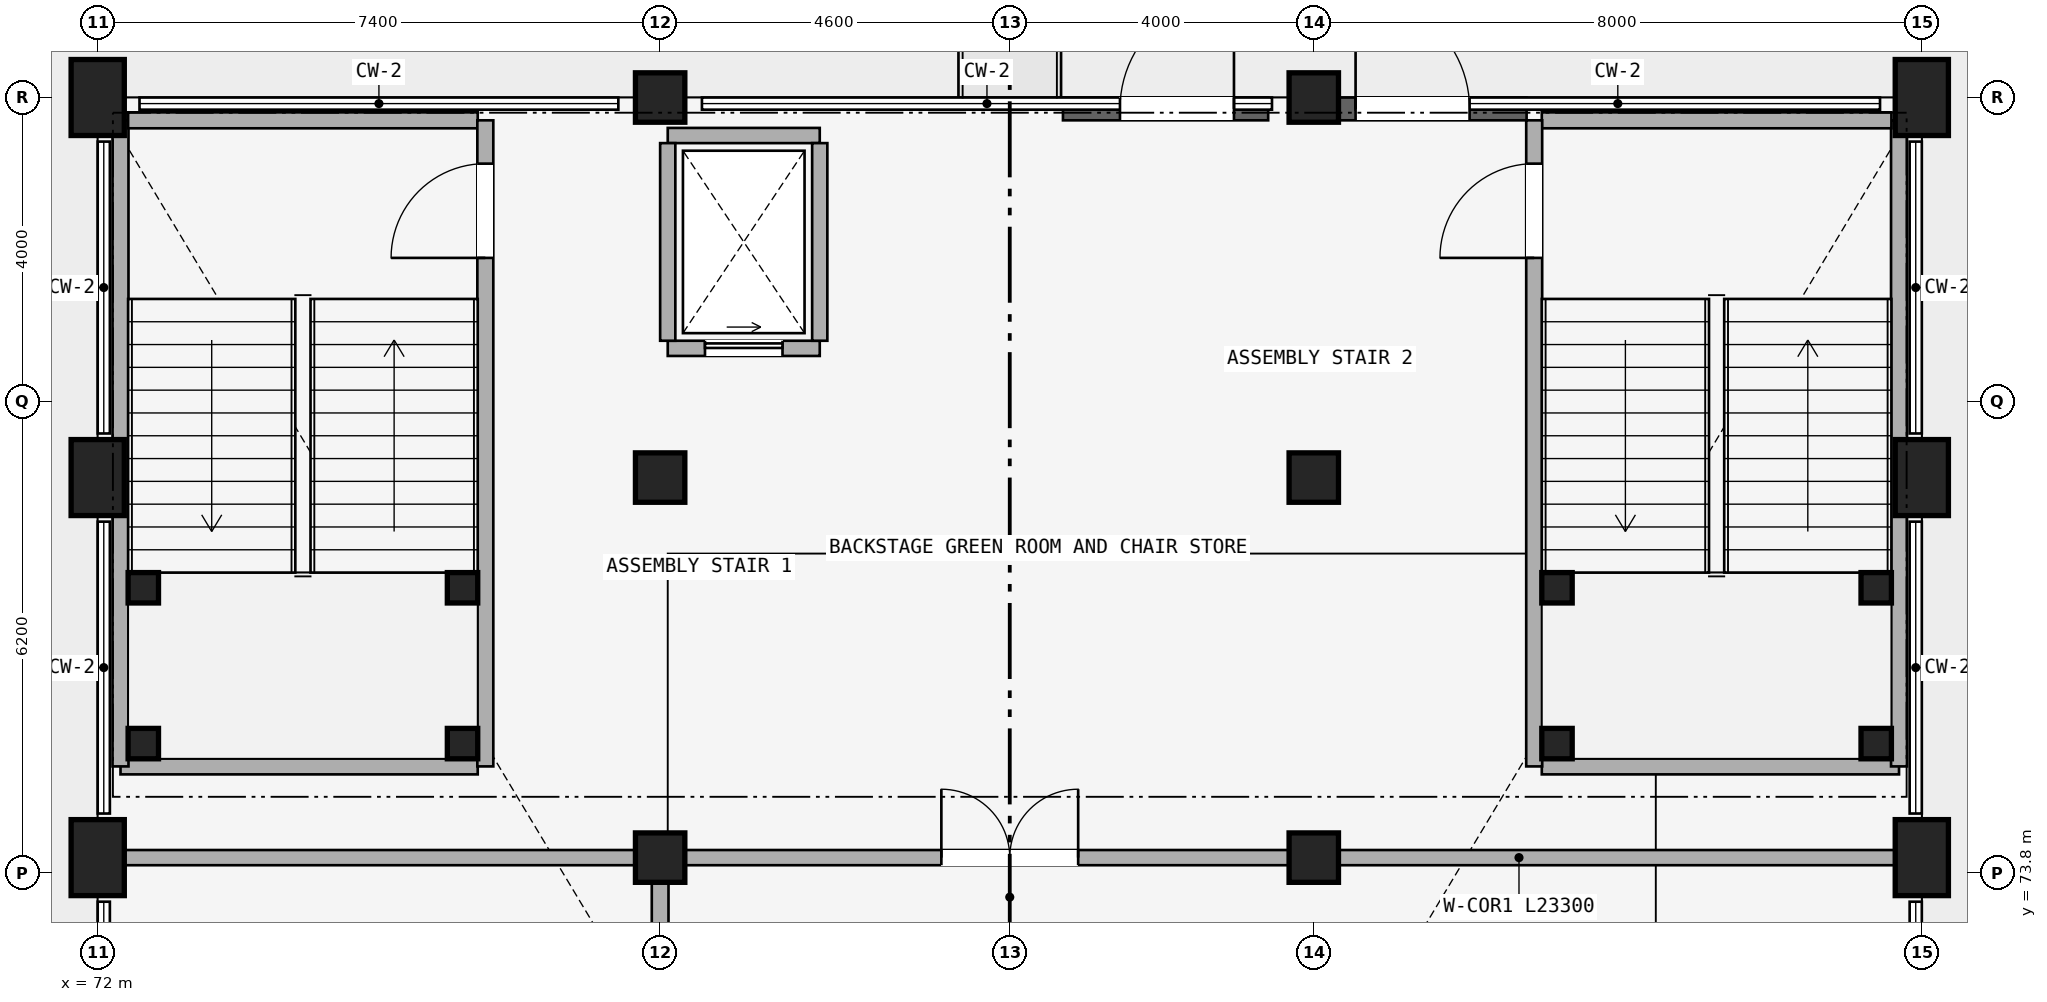
"""IFC4 building model, lengths in metres.
Left out: names, types, materials, properties, quantities, classifications, styles, units other than length and angle.
Written with IfcOpenShell. Run it as: python <this file> out.ifc"""

import sys

from ifc_helpers import new_model, si_unit, direction, frame, frame_2d, origin, origin_2d, place, context, subcontext, project, spatial, rectangle, extrude, element, fill, save


model = new_model("IFC4")
c1 = context("Model", 3, precision=1e-05, world=origin(), true_north=direction((0.0, 1.0)))
c2 = subcontext(c1, "Body", "Model", "MODEL_VIEW")
j1 = project(units=[si_unit("LENGTHUNIT", "METRE"), si_unit("PLANEANGLEUNIT", "RADIAN")], contexts=[c1])
p1 = place(None, origin())
s1 = spatial("IfcSite", under=j1, at=p1, CompositionType="ELEMENT")
p2 = place(p1, origin())
s2 = spatial("IfcBuilding", under=s1, at=p2, CompositionType="ELEMENT")
p3 = place(p2, origin())
s3 = spatial("IfcBuildingStorey", under=s2, at=p3, CompositionType="ELEMENT", Elevation=0.0)
for number, where, z_axis, x_axis in (
    (1, (72.0, 74.0, 0.0), (0.0, 0.0, 1.0), (1.0, 0.0, 0.0)),
    (2, (96.0, 74.0, 0.0), (0.0, 0.0, 1.0), (1.0, 0.0, 0.0)),
    (3, (72.0, 79.0, 0.0), (0.0, 0.0, 1.0), (1.0, 0.0, 0.0)),
    (4, (96.0, 79.0, 0.0), (0.0, 0.0, 1.0), (1.0, 0.0, 0.0)),
    (5, (72.0, 84.0, 0.0), (0.0, 0.0, 1.0), (1.0, 0.0, 0.0)),
    (6, (96.0, 84.0, 0.0), (0.0, 0.0, 1.0), (1.0, 0.0, 0.0)),
):
    element("IfcColumn", number, at=place(p3, frame(where, z_axis=z_axis, x_axis=x_axis)), inside=s3, PredefinedType="COLUMN", context=c2, shape_type="SweptSolid", body=[
        extrude(rectangle(XDim=0.7, YDim=1.0, at=origin_2d()), origin(), (0.0, 0.0, 1.0), 4.5),
    ])
for number, where, z_axis, x_axis in (
    (7, (79.4, 74.0, 0.0), (0.0, 0.0, 1.0), (1.0, 0.0, 0.0)),
    (8, (88.0, 74.0, 0.0), (0.0, 0.0, 1.0), (1.0, 0.0, 0.0)),
    (9, (79.4, 79.0, 0.0), (0.0, 0.0, 1.0), (1.0, 0.0, 0.0)),
    (10, (88.0, 79.0, 0.0), (0.0, 0.0, 1.0), (1.0, 0.0, 0.0)),
    (11, (79.4, 84.0, 0.0), (0.0, 0.0, 1.0), (1.0, 0.0, 0.0)),
    (12, (88.0, 84.0, 0.0), (0.0, 0.0, 1.0), (1.0, 0.0, 0.0)),
):
    element("IfcColumn", number, at=place(p3, frame(where, z_axis=z_axis, x_axis=x_axis)), inside=s3, PredefinedType="COLUMN", context=c2, shape_type="SweptSolid", body=[
        extrude(rectangle(XDim=0.65, YDim=0.65, at=origin_2d()), origin(), (0.0, 0.0, 1.0), 4.25),
    ])
for number, where, z_axis, x_axis in (
    (13, (72.6, 75.5, 0.0), (0.0, 0.0, 1.0), (1.0, 0.0, 0.0)),
    (14, (76.8, 75.5, 0.0), (0.0, 0.0, 1.0), (1.0, 0.0, 0.0)),
    (15, (72.6, 77.55, 0.0), (0.0, 0.0, 1.0), (1.0, 0.0, 0.0)),
    (16, (76.8, 77.55, 0.0), (0.0, 0.0, 1.0), (1.0, 0.0, 0.0)),
    (17, (91.2, 75.5, 0.0), (0.0, 0.0, 1.0), (1.0, 0.0, 0.0)),
    (18, (95.4, 75.5, 0.0), (0.0, 0.0, 1.0), (1.0, 0.0, 0.0)),
    (19, (91.2, 77.55, 0.0), (0.0, 0.0, 1.0), (1.0, 0.0, 0.0)),
    (20, (95.4, 77.55, 0.0), (0.0, 0.0, 1.0), (1.0, 0.0, 0.0)),
):
    element("IfcColumn", number, at=place(p3, frame(where, z_axis=z_axis, x_axis=x_axis)), inside=s3, PredefinedType="COLUMN", context=c2, shape_type="SweptSolid", body=[
        extrude(rectangle(XDim=0.4, YDim=0.4, at=origin_2d()), origin(), (0.0, 0.0, 1.0), 2.03),
    ])
p4 = place(p3, frame((72.3, 75.2, 0.0), z_axis=(0.0, 0.0, 1.0), x_axis=(1.0, 0.0, 0.0)))
e21 = element("IfcWall", 21, at=p4, inside=s3, PredefinedType="STANDARD", context=c2, shape_type="SweptSolid", body=[
    extrude(rectangle(XDim=4.7, YDim=0.21, at=frame_2d((2.35, 0.0))), origin(), (0.0, 0.0, 1.0), 4.22),
])
p5 = place(p3, frame((72.3, 75.2, 0.0), z_axis=(0.0, 0.0, 1.0), x_axis=(0.0, 1.0, 0.0)))
e22 = element("IfcWall", 22, at=p5, inside=s3, PredefinedType="STANDARD", context=c2, shape_type="SweptSolid", body=[
    extrude(rectangle(XDim=8.5, YDim=0.21, at=frame_2d((4.25, 0.0))), origin(), (0.0, 0.0, 1.0), 4.22),
])
p6 = place(p3, frame((72.4, 83.7, 0.0), z_axis=(0.0, 0.0, 1.0), x_axis=(1.0, 0.0, 0.0)))
e23 = element("IfcWall", 23, at=p6, inside=s3, PredefinedType="STANDARD", context=c2, shape_type="SweptSolid", body=[
    extrude(rectangle(XDim=4.6, YDim=0.21, at=frame_2d((2.3, 0.0))), origin(), (0.0, 0.0, 1.0), 3.492),
])
p7 = place(p3, frame((77.1, 75.2, 0.0), z_axis=(0.0, 0.0, 1.0), x_axis=(0.0, 1.0, 0.0)))
e24 = element("IfcWall", 24, at=p7, inside=s3, PredefinedType="STANDARD", context=c2, shape_type="SweptSolid", body=[
    extrude(rectangle(XDim=8.5, YDim=0.21, at=frame_2d((4.25, 0.0))), origin(), (0.0, 0.0, 1.0), 4.22),
])
p8 = place(p7, frame((6.69, 0.0, 0.0)))
e25 = element("IfcOpeningElement", 25, at=p8, cuts=e24, PredefinedType="OPENING", context=c2, shape_type="SweptSolid", body=[
    extrude(rectangle(XDim=1.24, YDim=2.15, at=frame_2d((0.62, 1.075))), frame((0.0, 0.115, 0.0), z_axis=(0.0, -1.0, 0.0), x_axis=(1.0, 0.0, 0.0)), (0.0, 0.0, 1.0), 0.23),
])
p9 = place(p3, frame((91.0, 75.2, 0.0), z_axis=(0.0, 0.0, 1.0), x_axis=(1.0, 0.0, 0.0)))
e26 = element("IfcWall", 26, at=p9, inside=s3, PredefinedType="STANDARD", context=c2, shape_type="SweptSolid", body=[
    extrude(rectangle(XDim=4.7, YDim=0.21, at=frame_2d((2.35, 0.0))), origin(), (0.0, 0.0, 1.0), 4.22),
])
p10 = place(p3, frame((95.7, 75.2, 0.0), z_axis=(0.0, 0.0, 1.0), x_axis=(0.0, 1.0, 0.0)))
e27 = element("IfcWall", 27, at=p10, inside=s3, PredefinedType="STANDARD", context=c2, shape_type="SweptSolid", body=[
    extrude(rectangle(XDim=8.5, YDim=0.21, at=frame_2d((4.25, 0.0))), origin(), (0.0, 0.0, 1.0), 4.22),
])
p11 = place(p3, frame((91.0, 83.7, 0.0), z_axis=(0.0, 0.0, 1.0), x_axis=(1.0, 0.0, 0.0)))
e28 = element("IfcWall", 28, at=p11, inside=s3, PredefinedType="STANDARD", context=c2, shape_type="SweptSolid", body=[
    extrude(rectangle(XDim=4.6, YDim=0.21, at=frame_2d((2.3, 0.0))), origin(), (0.0, 0.0, 1.0), 3.492),
])
p12 = place(p3, frame((90.9, 75.2, 0.0), z_axis=(0.0, 0.0, 1.0), x_axis=(0.0, 1.0, 0.0)))
e29 = element("IfcWall", 29, at=p12, inside=s3, PredefinedType="STANDARD", context=c2, shape_type="SweptSolid", body=[
    extrude(rectangle(XDim=8.5, YDim=0.21, at=frame_2d((4.25, 0.0))), origin(), (0.0, 0.0, 1.0), 4.22),
])
p13 = place(p12, frame((6.69, 0.0, 0.0)))
e30 = element("IfcOpeningElement", 30, at=p13, cuts=e29, PredefinedType="OPENING", context=c2, shape_type="SweptSolid", body=[
    extrude(rectangle(XDim=1.24, YDim=2.15, at=frame_2d((0.62, 1.075))), frame((0.0, 0.115, 0.0), z_axis=(0.0, -1.0, 0.0), x_axis=(1.0, 0.0, 0.0)), (0.0, 0.0, 1.0), 0.23),
])
p14 = place(p3, frame((79.5, 80.7, 0.0), z_axis=(0.0, 0.0, 1.0), x_axis=(1.0, 0.0, 0.0)))
e31 = element("IfcWall", 31, at=p14, inside=s3, PredefinedType="STANDARD", context=c2, shape_type="SweptSolid", body=[
    extrude(rectangle(XDim=2.0, YDim=0.2, at=frame_2d((1.0, 0.0))), origin(), (0.0, 0.0, 1.0), 4.22),
])
p15 = place(p14, frame((0.49, 0.0, 0.0)))
e32 = element("IfcOpeningElement", 32, at=p15, cuts=e31, PredefinedType="OPENING", context=c2, shape_type="SweptSolid", body=[
    extrude(rectangle(XDim=1.02, YDim=2.15, at=frame_2d((0.51, 1.075))), frame((0.0, 0.11, 0.0), z_axis=(0.0, -1.0, 0.0), x_axis=(1.0, 0.0, 0.0)), (0.0, 0.0, 1.0), 0.22),
])
p16 = place(p3, frame((79.5, 83.5, 0.0), z_axis=(0.0, 0.0, 1.0), x_axis=(1.0, 0.0, 0.0)))
e33 = element("IfcWall", 33, at=p16, inside=s3, PredefinedType="STANDARD", context=c2, shape_type="SweptSolid", body=[
    extrude(rectangle(XDim=2.0, YDim=0.2, at=frame_2d((1.0, 0.0))), origin(), (0.0, 0.0, 1.0), 4.22),
])
for number, where, z_axis, x_axis in (
    (34, (79.5, 80.8, 0.0), (0.0, 0.0, 1.0), (0.0, 1.0, 0.0)),
    (35, (81.5, 80.8, 0.0), (0.0, 0.0, 1.0), (0.0, 1.0, 0.0)),
):
    element("IfcWall", number, at=place(p3, frame(where, z_axis=z_axis, x_axis=x_axis)), inside=s3, PredefinedType="STANDARD", context=c2, shape_type="SweptSolid", body=[
        extrude(rectangle(XDim=2.6, YDim=0.2, at=frame_2d((1.3, 0.0))), origin(), (0.0, 0.0, 1.0), 4.22),
    ])
p17 = place(p3, frame((79.4, 54.0, 0.0), z_axis=(0.0, 0.0, 1.0), x_axis=(0.0, 1.0, 0.0)))
e36 = element("IfcWall", 36, at=p17, inside=s3, PredefinedType="STANDARD", context=c2, shape_type="SweptSolid", body=[
    extrude(rectangle(XDim=20.0, YDim=0.22, at=frame_2d((10.0, 0.0))), origin(), (0.0, 0.0, 1.0), 3.492),
])
p18 = place(p17, frame((4.55, 0.0, 0.0)))
e37 = element("IfcOpeningElement", 37, at=p18, cuts=e36, PredefinedType="OPENING", context=c2, shape_type="SweptSolid", body=[
    extrude(rectangle(XDim=0.9, YDim=2.1, at=frame_2d((0.45, 1.05))), frame((0.0, 0.12, 0.0), z_axis=(0.0, -1.0, 0.0), x_axis=(1.0, 0.0, 0.0)), (0.0, 0.0, 1.0), 0.24),
])
p19 = place(p3, frame((72.35, 74.0, 0.0), z_axis=(0.0, 0.0, 1.0), x_axis=(1.0, 0.0, 0.0)))
e38 = element("IfcWall", 38, at=p19, inside=s3, PredefinedType="STANDARD", context=c2, shape_type="SweptSolid", body=[
    extrude(rectangle(XDim=23.3, YDim=0.2, at=frame_2d((11.65, 0.0))), origin(), (0.0, 0.0, 1.0), 3.492),
])
p20 = place(p19, frame((10.75, 0.0, 0.0)))
e39 = element("IfcOpeningElement", 39, at=p20, cuts=e38, PredefinedType="OPENING", context=c2, shape_type="SweptSolid", body=[
    extrude(rectangle(XDim=1.8, YDim=2.2, at=frame_2d((0.9, 1.1))), frame((0.0, 0.11, 0.0), z_axis=(0.0, -1.0, 0.0), x_axis=(1.0, 0.0, 0.0)), (0.0, 0.0, 1.0), 0.22),
])
p21 = place(p3, frame((84.7, 83.85, 0.0), z_axis=(0.0, 0.0, 1.0), x_axis=(1.0, 0.0, 0.0)))
e40 = element("IfcWall", 40, at=p21, inside=s3, PredefinedType="STANDARD", context=c2, shape_type="SweptSolid", body=[
    extrude(rectangle(XDim=2.7, YDim=0.3, at=frame_2d((1.35, 0.0))), origin(), (0.0, 0.0, 1.0), 3.45),
])
p22 = place(p21, frame((0.75, 0.0, 0.0)))
e41 = element("IfcOpeningElement", 41, at=p22, cuts=e40, PredefinedType="OPENING", context=c2, shape_type="SweptSolid", body=[
    extrude(rectangle(XDim=1.5, YDim=2.15, at=frame_2d((0.75, 1.075))), frame((0.0, 0.16, 0.0), z_axis=(0.0, -1.0, 0.0), x_axis=(1.0, 0.0, 0.0)), (0.0, 0.0, 1.0), 0.32),
])
p23 = place(p3, frame((87.8, 83.85, 0.0), z_axis=(0.0, 0.0, 1.0), x_axis=(1.0, 0.0, 0.0)))
e42 = element("IfcWall", 42, at=p23, inside=s3, PredefinedType="STANDARD", context=c2, shape_type="SweptSolid", body=[
    extrude(rectangle(XDim=3.0, YDim=0.3, at=frame_2d((1.5, 0.0))), origin(), (0.0, 0.0, 1.0), 3.45),
])
p24 = place(p23, frame((0.75, 0.0, 0.0)))
e43 = element("IfcOpeningElement", 43, at=p24, cuts=e42, PredefinedType="OPENING", context=c2, shape_type="SweptSolid", body=[
    extrude(rectangle(XDim=1.5, YDim=2.15, at=frame_2d((0.75, 1.075))), frame((0.0, 0.16, 0.0), z_axis=(0.0, -1.0, 0.0), x_axis=(1.0, 0.0, 0.0)), (0.0, 0.0, 1.0), 0.32),
])
p25 = place(p8, frame((1.24, 0.0, 0.0), z_axis=(0.0, 0.0, 1.0), x_axis=(-1.0, 0.0, 0.0)))
e44 = element("IfcDoor", 44, at=p25, inside=s3, OperationType="SINGLE_SWING_RIGHT", PredefinedType="DOOR", context=c2, shape_type="SweptSolid", body=[
    extrude(rectangle(XDim=1.24, YDim=2.15, at=frame_2d((0.62, 1.075))), frame((0.0, 0.025, 0.0), z_axis=(0.0, -1.0, 0.0), x_axis=(1.0, 0.0, 0.0)), (0.0, 0.0, 1.0), 0.05),
])
fill(e25, e44)
p26 = place(p13, origin())
e45 = element("IfcDoor", 45, at=p26, inside=s3, OperationType="SINGLE_SWING_LEFT", PredefinedType="DOOR", context=c2, shape_type="SweptSolid", body=[
    extrude(rectangle(XDim=1.24, YDim=2.15, at=frame_2d((0.62, 1.075))), frame((0.0, 0.025, 0.0), z_axis=(0.0, -1.0, 0.0), x_axis=(1.0, 0.0, 0.0)), (0.0, 0.0, 1.0), 0.05),
])
fill(e30, e45)
p27 = place(p15, origin())
e46 = element("IfcDoor", 46, at=p27, inside=s3, OperationType="SLIDING_TO_RIGHT", PredefinedType="DOOR", context=c2, shape_type="SweptSolid", body=[
    extrude(rectangle(XDim=1.02, YDim=2.15, at=frame_2d((0.51, 1.075))), frame((0.0, 0.025, 0.0), z_axis=(0.0, -1.0, 0.0), x_axis=(1.0, 0.0, 0.0)), (0.0, 0.0, 1.0), 0.05),
])
fill(e32, e46)
p28 = place(p20, origin())
e47 = element("IfcDoor", 47, at=p28, inside=s3, OperationType="DOUBLE_DOOR_SINGLE_SWING", PredefinedType="DOOR", context=c2, shape_type="SweptSolid", body=[
    extrude(rectangle(XDim=1.8, YDim=2.2, at=frame_2d((0.9, 1.1))), frame((0.0, 0.025, 0.0), z_axis=(0.0, -1.0, 0.0), x_axis=(1.0, 0.0, 0.0)), (0.0, 0.0, 1.0), 0.05),
])
fill(e39, e47)
p29 = place(p22, origin())
e48 = element("IfcDoor", 48, at=p29, inside=s3, OperationType="SINGLE_SWING_RIGHT", PredefinedType="DOOR", context=c2, shape_type="SweptSolid", body=[
    extrude(rectangle(XDim=1.5, YDim=2.15, at=frame_2d((0.75, 1.075))), frame((0.0, 0.025, 0.0), z_axis=(0.0, -1.0, 0.0), x_axis=(1.0, 0.0, 0.0)), (0.0, 0.0, 1.0), 0.05),
])
fill(e41, e48)
p30 = place(p24, origin())
e49 = element("IfcDoor", 49, at=p30, inside=s3, OperationType="SINGLE_SWING_LEFT", PredefinedType="DOOR", context=c2, shape_type="SweptSolid", body=[
    extrude(rectangle(XDim=1.5, YDim=2.15, at=frame_2d((0.75, 1.075))), frame((0.0, 0.025, 0.0), z_axis=(0.0, -1.0, 0.0), x_axis=(1.0, 0.0, 0.0)), (0.0, 0.0, 1.0), 0.05),
])
fill(e43, e49)
save(model, sys.argv[1])
